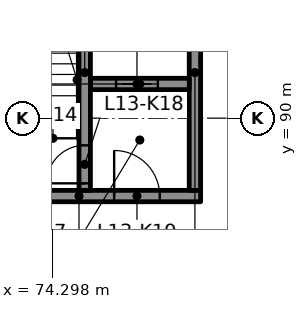
"""IFC4 building model, lengths in metres.
Left out: names, types, materials, properties, quantities, classifications, styles, units other than length and angle.
Written with IfcOpenShell. Run it as: python <this file> out.ifc"""

import sys

from ifc_helpers import new_model, si_unit, direction, frame, frame_2d, origin, place, context, subcontext, project, spatial, rectangle, extrude, element, fill, save


model = new_model("IFC4")
c1 = context("Model", 3, precision=1e-05, world=origin(), true_north=direction((0.0, 1.0)))
c2 = subcontext(c1, "Body", "Model", "MODEL_VIEW")
j1 = project(units=[si_unit("LENGTHUNIT", "METRE"), si_unit("PLANEANGLEUNIT", "RADIAN")], contexts=[c1])
p1 = place(None, origin())
s1 = spatial("IfcSite", under=j1, at=p1, CompositionType="ELEMENT")
p2 = place(p1, origin())
s2 = spatial("IfcBuilding", under=s1, at=p2, CompositionType="ELEMENT")
p3 = place(p2, frame((0.0, 0.0, 61.0)))
s3 = spatial("IfcBuildingStorey", under=s2, at=p3, CompositionType="ELEMENT", Elevation=61.0)
p4 = place(p3, frame((71.8, 87.95, 0.0), z_axis=(0.0, 0.0, 1.0), x_axis=(1.0, 0.0, 0.0)))
e1 = element("IfcWall", 1, at=p4, inside=s3, PredefinedType="SHEAR", context=c2, shape_type="SweptSolid", body=[
    extrude(rectangle(XDim=6.4, YDim=0.3, at=frame_2d((3.2, 0.0))), origin(), (0.0, 0.0, 1.0), 4.0),
])
p5 = place(p4, frame((1.325, 0.0, 0.0)))
e2 = element("IfcOpeningElement", 2, at=p5, cuts=e1, PredefinedType="OPENING", context=c2, shape_type="SweptSolid", body=[
    extrude(rectangle(XDim=1.0, YDim=2.1, at=frame_2d((0.5, 1.05))), frame((0.0, 0.16, 0.0), z_axis=(0.0, -1.0, 0.0), x_axis=(1.0, 0.0, 0.0)), (0.0, 0.0, 1.0), 0.32),
])
p6 = place(p4, frame((4.125, 0.0, 0.0)))
e3 = element("IfcOpeningElement", 3, at=p6, cuts=e1, PredefinedType="OPENING", context=c2, shape_type="SweptSolid", body=[
    extrude(rectangle(XDim=1.2, YDim=2.1, at=frame_2d((0.6, 1.05))), frame((0.0, 0.16, 0.0), z_axis=(0.0, -1.0, 0.0), x_axis=(1.0, 0.0, 0.0)), (0.0, 0.0, 1.0), 0.32),
])
p7 = place(p3, frame((78.05, 88.1, 0.0), z_axis=(0.0, 0.0, 1.0), x_axis=(0.0, 1.0, 0.0)))
e4 = element("IfcWall", 4, at=p7, inside=s3, PredefinedType="SHEAR", context=c2, shape_type="SweptSolid", body=[
    extrude(rectangle(XDim=6.2, YDim=0.3, at=frame_2d((3.1, 0.0))), origin(), (0.0, 0.0, 1.0), 4.0),
])
p8 = place(p3, frame((75.3, 90.9, 0.0), z_axis=(0.0, 0.0, 1.0), x_axis=(1.0, 0.0, 0.0)))
e5 = element("IfcWall", 5, at=p8, inside=s3, PredefinedType="SHEAR", context=c2, shape_type="SweptSolid", body=[
    extrude(rectangle(XDim=2.6, YDim=0.3, at=frame_2d((1.3, 0.0))), origin(), (0.0, 0.0, 1.0), 4.0),
])
p9 = place(p8, frame((0.675, 0.0, 0.0)))
e6 = element("IfcOpeningElement", 6, at=p9, cuts=e5, PredefinedType="OPENING", context=c2, shape_type="SweptSolid", body=[
    extrude(rectangle(XDim=1.1, YDim=2.1, at=frame_2d((0.55, 1.05))), frame((0.0, 0.16, 0.0), z_axis=(0.0, -1.0, 0.0), x_axis=(1.0, 0.0, 0.0)), (0.0, 0.0, 1.0), 0.32),
])
p10 = place(p3, frame((75.15, 88.1, 0.0), z_axis=(0.0, 0.0, 1.0), x_axis=(0.0, 1.0, 0.0)))
e7 = element("IfcWall", 7, at=p10, inside=s3, PredefinedType="SHEAR", context=c2, shape_type="SweptSolid", body=[
    extrude(rectangle(XDim=6.2, YDim=0.3, at=frame_2d((3.1, 0.0))), origin(), (0.0, 0.0, 1.0), 4.0),
])
p11 = place(p10, frame((0.185, 0.0, 0.0)))
e8 = element("IfcOpeningElement", 8, at=p11, cuts=e7, PredefinedType="OPENING", context=c2, shape_type="SweptSolid", body=[
    extrude(rectangle(XDim=1.0, YDim=2.1, at=frame_2d((0.5, 1.05))), frame((0.0, 0.16, 0.0), z_axis=(0.0, -1.0, 0.0), x_axis=(1.0, 0.0, 0.0)), (0.0, 0.0, 1.0), 0.32),
])
p12 = place(p9, origin())
e9 = element("IfcDoor", 9, at=p12, inside=s3, OperationType="DOUBLE_DOOR_SLIDING", PredefinedType="DOOR", context=c2, shape_type="SweptSolid", body=[
    extrude(rectangle(XDim=1.1, YDim=2.1, at=frame_2d((0.55, 1.05))), frame((0.0, 0.025, 0.0), z_axis=(0.0, -1.0, 0.0), x_axis=(1.0, 0.0, 0.0)), (0.0, 0.0, 1.0), 0.05),
])
fill(e6, e9)
p13 = place(p11, origin())
e10 = element("IfcDoor", 10, at=p13, inside=s3, OperationType="SINGLE_SWING_LEFT", PredefinedType="DOOR", context=c2, shape_type="SweptSolid", body=[
    extrude(rectangle(XDim=1.0, YDim=2.1, at=frame_2d((0.5, 1.05))), frame((0.0, 0.025, 0.0), z_axis=(0.0, -1.0, 0.0), x_axis=(1.0, 0.0, 0.0)), (0.0, 0.0, 1.0), 0.05),
])
fill(e8, e10)
p14 = place(p6, origin())
e11 = element("IfcDoor", 11, at=p14, inside=s3, OperationType="SINGLE_SWING_RIGHT", PredefinedType="DOOR", context=c2, shape_type="SweptSolid", body=[
    extrude(rectangle(XDim=1.2, YDim=2.1, at=frame_2d((0.6, 1.05))), frame((0.0, 0.025, 0.0), z_axis=(0.0, -1.0, 0.0), x_axis=(1.0, 0.0, 0.0)), (0.0, 0.0, 1.0), 0.05),
])
fill(e3, e11)
save(model, sys.argv[1])
